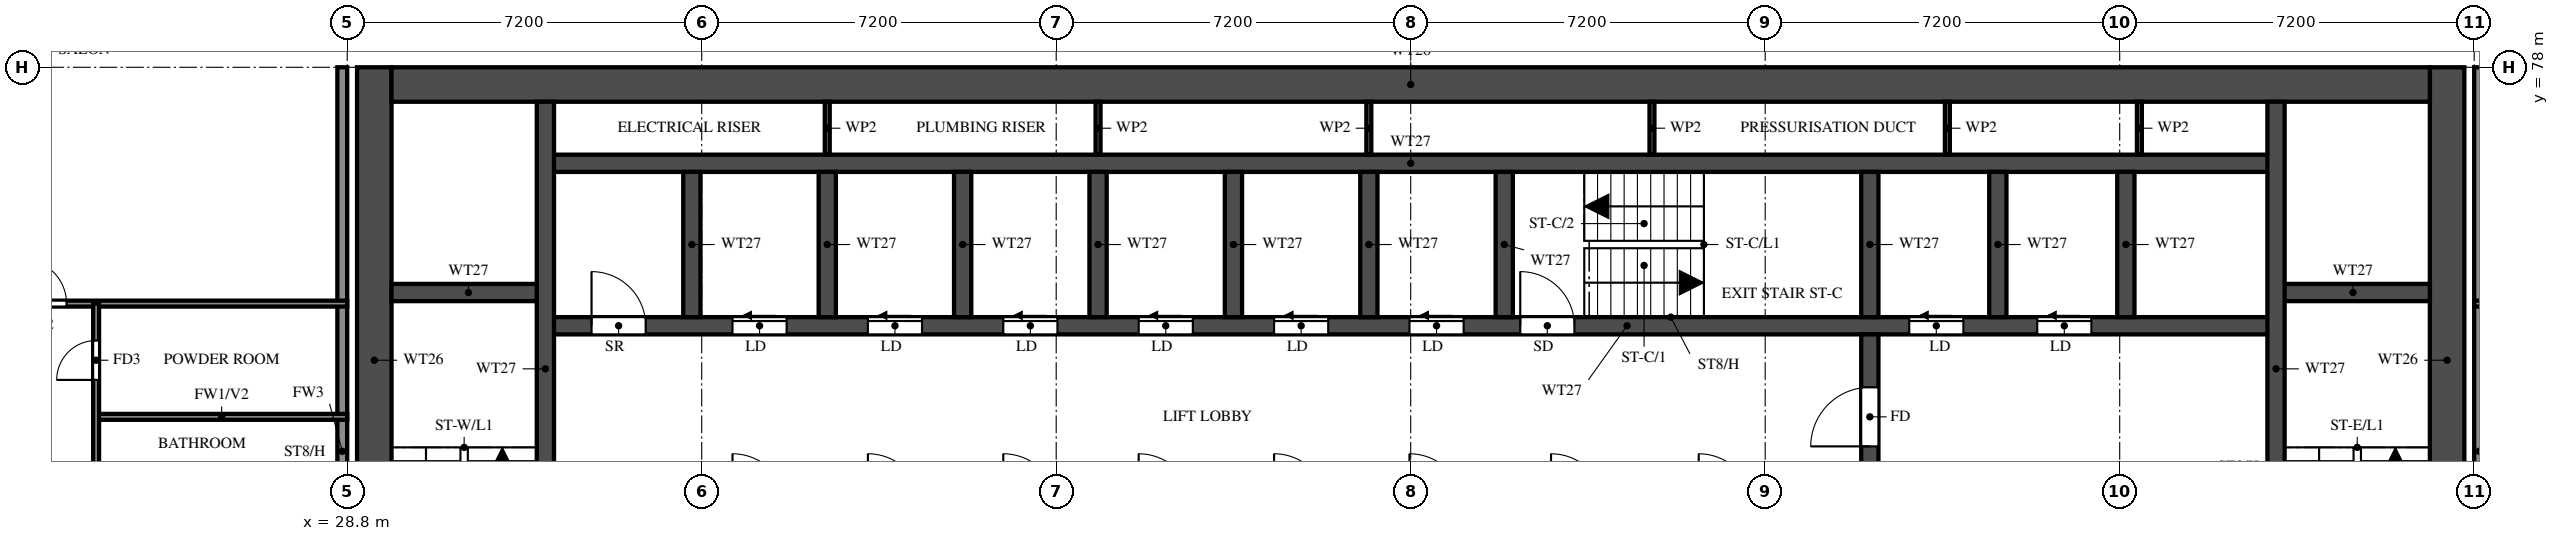
"""IFC4 building model, lengths in metres.
Left out: names, types, materials, properties, quantities, classifications, styles, units other than length and angle.
Written with IfcOpenShell. Run it as: python <this file> out.ifc"""

import sys

from ifc_helpers import new_model, si_unit, direction, frame, frame_2d, origin, place, context, subcontext, project, spatial, rectangle, extrude, element, fill, save


model = new_model("IFC4")
c1 = context("Model", 3, precision=1e-05, world=origin(), true_north=direction((0.0, 1.0)))
c2 = subcontext(c1, "Body", "Model", "MODEL_VIEW")
j1 = project(units=[si_unit("LENGTHUNIT", "METRE"), si_unit("PLANEANGLEUNIT", "RADIAN")], contexts=[c1])
p1 = place(None, origin())
s1 = spatial("IfcSite", under=j1, at=p1, CompositionType="ELEMENT")
p2 = place(p1, origin())
s2 = spatial("IfcBuilding", under=s1, at=p2, CompositionType="ELEMENT")
p3 = place(p2, frame((0.0, 0.0, 178.0)))
s3 = spatial("IfcBuildingStorey", under=s2, at=p3, CompositionType="ELEMENT", Elevation=178.0)
for number, where, z_axis, x_axis in (
    (1, (29.35, 66.1, 0.0), (0.0, 0.0, 1.0), (0.0, 1.0, 0.0)),
    (2, (71.45, 66.1, 0.0), (0.0, 0.0, 1.0), (0.0, 1.0, 0.0)),
):
    element("IfcWall", number, at=place(p3, frame(where, z_axis=z_axis, x_axis=x_axis)), inside=s3, PredefinedType="SHEAR", context=c2, shape_type="SweptSolid", body=[
        extrude(rectangle(XDim=11.9, YDim=0.7, at=frame_2d((5.95, 0.0))), origin(), (0.0, 0.0, 1.0), 3.2),
    ])
p4 = place(p3, frame((29.7, 77.65, 0.0), z_axis=(0.0, 0.0, 1.0), x_axis=(1.0, 0.0, 0.0)))
e3 = element("IfcWall", 3, at=p4, inside=s3, PredefinedType="SHEAR", context=c2, shape_type="SweptSolid", body=[
    extrude(rectangle(XDim=41.4, YDim=0.7, at=frame_2d((20.7, 0.0))), origin(), (0.0, 0.0, 1.0), 3.2),
])
p5 = place(p3, frame((32.825, 72.75, 0.0), z_axis=(0.0, 0.0, 1.0), x_axis=(1.0, 0.0, 0.0)))
e4 = element("IfcWall", 4, at=p5, inside=s3, PredefinedType="SHEAR", context=c2, shape_type="SweptSolid", body=[
    extrude(rectangle(XDim=35.15, YDim=0.35, at=frame_2d((17.575, 0.0))), origin(), (0.0, 0.0, 1.0), 3.2),
])
p6 = place(p5, frame((19.8, 0.0, 0.0)))
e5 = element("IfcOpeningElement", 5, at=p6, cuts=e4, PredefinedType="OPENING", context=c2, shape_type="SweptSolid", body=[
    extrude(rectangle(XDim=1.1, YDim=2.1, at=frame_2d((0.55, 1.05))), frame((0.0, 0.185, 0.0), z_axis=(0.0, -1.0, 0.0), x_axis=(1.0, 0.0, 0.0)), (0.0, 0.0, 1.0), 0.37),
])
p7 = place(p5, frame((27.7, 0.0, 0.0)))
e6 = element("IfcOpeningElement", 6, at=p7, cuts=e4, PredefinedType="OPENING", context=c2, shape_type="SweptSolid", body=[
    extrude(rectangle(XDim=1.1, YDim=2.1, at=frame_2d((0.55, 1.05))), frame((0.0, 0.185, 0.0), z_axis=(0.0, -1.0, 0.0), x_axis=(1.0, 0.0, 0.0)), (0.0, 0.0, 1.0), 0.37),
])
p8 = place(p5, frame((30.3, 0.0, 0.0)))
e7 = element("IfcOpeningElement", 7, at=p8, cuts=e4, PredefinedType="OPENING", context=c2, shape_type="SweptSolid", body=[
    extrude(rectangle(XDim=1.1, YDim=2.1, at=frame_2d((0.55, 1.05))), frame((0.0, 0.185, 0.0), z_axis=(0.0, -1.0, 0.0), x_axis=(1.0, 0.0, 0.0)), (0.0, 0.0, 1.0), 0.37),
])
p9 = place(p5, frame((3.8, 0.0, 0.0)))
e8 = element("IfcOpeningElement", 8, at=p9, cuts=e4, PredefinedType="OPENING", context=c2, shape_type="SweptSolid", body=[
    extrude(rectangle(XDim=1.1, YDim=2.1, at=frame_2d((0.55, 1.05))), frame((0.0, 0.185, 0.0), z_axis=(0.0, -1.0, 0.0), x_axis=(1.0, 0.0, 0.0)), (0.0, 0.0, 1.0), 0.37),
])
p10 = place(p5, frame((6.55, 0.0, 0.0)))
e9 = element("IfcOpeningElement", 9, at=p10, cuts=e4, PredefinedType="OPENING", context=c2, shape_type="SweptSolid", body=[
    extrude(rectangle(XDim=1.1, YDim=2.1, at=frame_2d((0.55, 1.05))), frame((0.0, 0.185, 0.0), z_axis=(0.0, -1.0, 0.0), x_axis=(1.0, 0.0, 0.0)), (0.0, 0.0, 1.0), 0.37),
])
p11 = place(p5, frame((9.3, 0.0, 0.0)))
e10 = element("IfcOpeningElement", 10, at=p11, cuts=e4, PredefinedType="OPENING", context=c2, shape_type="SweptSolid", body=[
    extrude(rectangle(XDim=1.1, YDim=2.1, at=frame_2d((0.55, 1.05))), frame((0.0, 0.185, 0.0), z_axis=(0.0, -1.0, 0.0), x_axis=(1.0, 0.0, 0.0)), (0.0, 0.0, 1.0), 0.37),
])
p12 = place(p5, frame((12.05, 0.0, 0.0)))
e11 = element("IfcOpeningElement", 11, at=p12, cuts=e4, PredefinedType="OPENING", context=c2, shape_type="SweptSolid", body=[
    extrude(rectangle(XDim=1.1, YDim=2.1, at=frame_2d((0.55, 1.05))), frame((0.0, 0.185, 0.0), z_axis=(0.0, -1.0, 0.0), x_axis=(1.0, 0.0, 0.0)), (0.0, 0.0, 1.0), 0.37),
])
p13 = place(p5, frame((14.8, 0.0, 0.0)))
e12 = element("IfcOpeningElement", 12, at=p13, cuts=e4, PredefinedType="OPENING", context=c2, shape_type="SweptSolid", body=[
    extrude(rectangle(XDim=1.1, YDim=2.1, at=frame_2d((0.55, 1.05))), frame((0.0, 0.185, 0.0), z_axis=(0.0, -1.0, 0.0), x_axis=(1.0, 0.0, 0.0)), (0.0, 0.0, 1.0), 0.37),
])
p14 = place(p5, frame((17.55, 0.0, 0.0)))
e13 = element("IfcOpeningElement", 13, at=p14, cuts=e4, PredefinedType="OPENING", context=c2, shape_type="SweptSolid", body=[
    extrude(rectangle(XDim=1.1, YDim=2.1, at=frame_2d((0.55, 1.05))), frame((0.0, 0.185, 0.0), z_axis=(0.0, -1.0, 0.0), x_axis=(1.0, 0.0, 0.0)), (0.0, 0.0, 1.0), 0.37),
])
p15 = place(p5, frame((0.938, 0.0, 0.0)))
e14 = element("IfcOpeningElement", 14, at=p15, cuts=e4, PredefinedType="OPENING", context=c2, shape_type="SweptSolid", body=[
    extrude(rectangle(XDim=1.1, YDim=2.1, at=frame_2d((0.55, 1.05))), frame((0.0, 0.185, 0.0), z_axis=(0.0, -1.0, 0.0), x_axis=(1.0, 0.0, 0.0)), (0.0, 0.0, 1.0), 0.37),
])
p16 = place(p3, frame((32.825, 76.05, 0.0), z_axis=(0.0, 0.0, 1.0), x_axis=(1.0, 0.0, 0.0)))
e15 = element("IfcWall", 15, at=p16, inside=s3, PredefinedType="SHEAR", context=c2, shape_type="SweptSolid", body=[
    extrude(rectangle(XDim=35.15, YDim=0.35, at=frame_2d((17.575, 0.0))), origin(), (0.0, 0.0, 1.0), 3.2),
])
for number, where, z_axis, x_axis in (
    (16, (29.7, 73.425, 0.0), (0.0, 0.0, 1.0), (1.0, 0.0, 0.0)),
    (17, (67.975, 73.425, 0.0), (0.0, 0.0, 1.0), (1.0, 0.0, 0.0)),
):
    element("IfcWall", number, at=place(p3, frame(where, z_axis=z_axis, x_axis=x_axis)), inside=s3, PredefinedType="SHEAR", context=c2, shape_type="SweptSolid", body=[
        extrude(rectangle(XDim=3.125, YDim=0.35, at=frame_2d((1.562, 0.0))), origin(), (0.0, 0.0, 1.0), 3.2),
    ])
p17 = place(p3, frame((32.825, 66.45, 0.0), z_axis=(0.0, 0.0, 1.0), x_axis=(0.0, 1.0, 0.0)))
e18 = element("IfcWall", 18, at=p17, inside=s3, PredefinedType="SHEAR", context=c2, shape_type="SweptSolid", body=[
    extrude(rectangle(XDim=10.85, YDim=0.35, at=frame_2d((5.425, 0.0))), origin(), (0.0, 0.0, 1.0), 3.2),
])
p18 = place(p3, frame((67.975, 66.45, 0.0), z_axis=(0.0, 0.0, 1.0), x_axis=(0.0, 1.0, 0.0)))
e19 = element("IfcWall", 19, at=p18, inside=s3, PredefinedType="SHEAR", context=c2, shape_type="SweptSolid", body=[
    extrude(rectangle(XDim=10.85, YDim=0.35, at=frame_2d((5.425, 0.0))), origin(), (0.0, 0.0, 1.0), 3.2),
])
p19 = place(p18, frame((0.15, 0.0, 0.0)))
e20 = element("IfcOpeningElement", 20, at=p19, cuts=e19, PredefinedType="OPENING", context=c2, shape_type="SweptSolid", body=[
    extrude(rectangle(XDim=1.1, YDim=2.1, at=frame_2d((0.55, 1.05))), frame((0.0, 0.185, 0.0), z_axis=(0.0, -1.0, 0.0), x_axis=(1.0, 0.0, 0.0)), (0.0, 0.0, 1.0), 0.37),
])
p20 = place(p3, frame((59.725, 66.45, 0.0), z_axis=(0.0, 0.0, 1.0), x_axis=(0.0, 1.0, 0.0)))
e21 = element("IfcWall", 21, at=p20, inside=s3, PredefinedType="SHEAR", context=c2, shape_type="SweptSolid", body=[
    extrude(rectangle(XDim=6.125, YDim=0.35, at=frame_2d((3.062, 0.0))), origin(), (0.0, 0.0, 1.0), 3.2),
])
p21 = place(p20, frame((3.85, 0.0, 0.0)))
e22 = element("IfcOpeningElement", 22, at=p21, cuts=e21, PredefinedType="OPENING", context=c2, shape_type="SweptSolid", body=[
    extrude(rectangle(XDim=1.2, YDim=2.1, at=frame_2d((0.6, 1.05))), frame((0.0, 0.185, 0.0), z_axis=(0.0, -1.0, 0.0), x_axis=(1.0, 0.0, 0.0)), (0.0, 0.0, 1.0), 0.37),
])
for number, where, z_axis, x_axis in (
    (23, (59.725, 72.925, 0.0), (0.0, 0.0, 1.0), (0.0, 1.0, 0.0)),
    (24, (35.8, 72.925, 0.0), (0.0, 0.0, 1.0), (0.0, 1.0, 0.0)),
    (25, (38.55, 72.925, 0.0), (0.0, 0.0, 1.0), (0.0, 1.0, 0.0)),
    (26, (41.3, 72.925, 0.0), (0.0, 0.0, 1.0), (0.0, 1.0, 0.0)),
    (27, (44.05, 72.925, 0.0), (0.0, 0.0, 1.0), (0.0, 1.0, 0.0)),
    (28, (46.8, 72.925, 0.0), (0.0, 0.0, 1.0), (0.0, 1.0, 0.0)),
    (29, (49.55, 72.925, 0.0), (0.0, 0.0, 1.0), (0.0, 1.0, 0.0)),
    (30, (52.3, 72.925, 0.0), (0.0, 0.0, 1.0), (0.0, 1.0, 0.0)),
    (31, (62.325, 72.925, 0.0), (0.0, 0.0, 1.0), (0.0, 1.0, 0.0)),
    (32, (64.925, 72.925, 0.0), (0.0, 0.0, 1.0), (0.0, 1.0, 0.0)),
):
    element("IfcWall", number, at=place(p3, frame(where, z_axis=z_axis, x_axis=x_axis)), inside=s3, PredefinedType="SHEAR", context=c2, shape_type="SweptSolid", body=[
        extrude(rectangle(XDim=2.95, YDim=0.35, at=frame_2d((1.475, 0.0))), origin(), (0.0, 0.0, 1.0), 3.2),
    ])
for number, where, z_axis, x_axis in (
    (33, (38.55, 76.225, 0.0), (0.0, 0.0, 1.0), (0.0, 1.0, 0.0)),
    (34, (44.05, 76.225, 0.0), (0.0, 0.0, 1.0), (0.0, 1.0, 0.0)),
    (35, (49.55, 76.225, 0.0), (0.0, 0.0, 1.0), (0.0, 1.0, 0.0)),
    (36, (55.3, 76.225, 0.0), (0.0, 0.0, 1.0), (0.0, 1.0, 0.0)),
    (37, (61.3, 76.225, 0.0), (0.0, 0.0, 1.0), (0.0, 1.0, 0.0)),
    (38, (65.2, 76.225, 0.0), (0.0, 0.0, 1.0), (0.0, 1.0, 0.0)),
):
    element("IfcWall", number, at=place(p3, frame(where, z_axis=z_axis, x_axis=x_axis)), inside=s3, PredefinedType="PARTITIONING", context=c2, shape_type="SweptSolid", body=[
        extrude(rectangle(XDim=1.075, YDim=0.1, at=frame_2d((0.538, 0.0))), origin(), (0.0, 0.0, 1.0), 3.2),
    ])
for number, where, z_axis, x_axis in (
    (39, (28.7, 62.4, 0.0), (0.0, 0.0, 1.0), (0.0, 1.0, 0.0)),
    (40, (72.1, 62.4, 0.0), (0.0, 0.0, 1.0), (0.0, 1.0, 0.0)),
):
    element("IfcWall", number, at=place(p3, frame(where, z_axis=z_axis, x_axis=x_axis)), inside=s3, PredefinedType="SOLIDWALL", context=c2, shape_type="SweptSolid", body=[
        extrude(rectangle(XDim=15.6, YDim=0.2, at=frame_2d((7.8, 0.0))), origin(), (0.0, 0.0, 1.0), 3.2),
    ])
p22 = place(p3, frame((23.7, 70.9, 0.0), z_axis=(0.0, 0.0, 1.0), x_axis=(1.0, 0.0, 0.0)))
e41 = element("IfcWall", 41, at=p22, inside=s3, PredefinedType="PARTITIONING", context=c2, shape_type="SweptSolid", body=[
    extrude(rectangle(XDim=5.1, YDim=0.12, at=frame_2d((2.55, 0.0))), origin(), (0.0, 0.0, 1.0), 3.2),
])
p23 = place(p3, frame((14.525, 73.2, 0.0), z_axis=(0.0, 0.0, 1.0), x_axis=(1.0, 0.0, 0.0)))
e42 = element("IfcWall", 42, at=p23, inside=s3, PredefinedType="PARTITIONING", context=c2, shape_type="SweptSolid", body=[
    extrude(rectangle(XDim=14.275, YDim=0.12, at=frame_2d((7.138, 0.0))), origin(), (0.0, 0.0, 1.0), 2.3),
])
p24 = place(p23, frame((7.675, 0.0, 0.0)))
e43 = element("IfcOpeningElement", 43, at=p24, cuts=e42, PredefinedType="OPENING", context=c2, shape_type="SweptSolid", body=[
    extrude(rectangle(XDim=0.9, YDim=2.1, at=frame_2d((0.45, 1.05))), frame((0.0, 0.07, 0.0), z_axis=(0.0, -1.0, 0.0), x_axis=(1.0, 0.0, 0.0)), (0.0, 0.0, 1.0), 0.14),
])
p25 = place(p3, frame((72.0, 73.2, 0.0), z_axis=(0.0, 0.0, 1.0), x_axis=(1.0, 0.0, 0.0)))
e44 = element("IfcWall", 44, at=p25, inside=s3, PredefinedType="PARTITIONING", context=c2, shape_type="SweptSolid", body=[
    extrude(rectangle(XDim=14.275, YDim=0.12, at=frame_2d((7.137, 0.0))), origin(), (0.0, 0.0, 1.0), 2.3),
])
p26 = place(p25, frame((5.7, 0.0, 0.0)))
e45 = element("IfcOpeningElement", 45, at=p26, cuts=e44, PredefinedType="OPENING", context=c2, shape_type="SweptSolid", body=[
    extrude(rectangle(XDim=0.9, YDim=2.1, at=frame_2d((0.45, 1.05))), frame((0.0, 0.07, 0.0), z_axis=(0.0, -1.0, 0.0), x_axis=(1.0, 0.0, 0.0)), (0.0, 0.0, 1.0), 0.14),
])
p27 = place(p3, frame((23.7, 61.2, 0.0), z_axis=(0.0, 0.0, 1.0), x_axis=(0.0, 1.0, 0.0)))
e46 = element("IfcWall", 46, at=p27, inside=s3, PredefinedType="PARTITIONING", context=c2, shape_type="SweptSolid", body=[
    extrude(rectangle(XDim=12.0, YDim=0.12, at=frame_2d((6.0, 0.0))), origin(), (0.0, 0.0, 1.0), 3.2),
])
p28 = place(p27, frame((4.2, 0.0, 0.0)))
e47 = element("IfcOpeningElement", 47, at=p28, cuts=e46, PredefinedType="OPENING", context=c2, shape_type="SweptSolid", body=[
    extrude(rectangle(XDim=0.9, YDim=2.1, at=frame_2d((0.45, 1.05))), frame((0.0, 0.07, 0.0), z_axis=(0.0, -1.0, 0.0), x_axis=(1.0, 0.0, 0.0)), (0.0, 0.0, 1.0), 0.14),
])
p29 = place(p27, frame((7.975, 0.0, 0.0)))
e48 = element("IfcOpeningElement", 48, at=p29, cuts=e46, PredefinedType="OPENING", context=c2, shape_type="SweptSolid", body=[
    extrude(rectangle(XDim=0.8, YDim=2.1, at=frame_2d((0.4, 1.05))), frame((0.0, 0.07, 0.0), z_axis=(0.0, -1.0, 0.0), x_axis=(1.0, 0.0, 0.0)), (0.0, 0.0, 1.0), 0.14),
])
p30 = place(p27, frame((10.45, 0.0, 0.0)))
e49 = element("IfcOpeningElement", 49, at=p30, cuts=e46, PredefinedType="OPENING", context=c2, shape_type="SweptSolid", body=[
    extrude(rectangle(XDim=0.8, YDim=2.1, at=frame_2d((0.4, 1.05))), frame((0.0, 0.07, 0.0), z_axis=(0.0, -1.0, 0.0), x_axis=(1.0, 0.0, 0.0)), (0.0, 0.0, 1.0), 0.14),
])
p31 = place(p6, origin())
e50 = element("IfcDoor", 50, at=p31, inside=s3, OperationType="SINGLE_SWING_LEFT", PredefinedType="DOOR", context=c2, shape_type="SweptSolid", body=[
    extrude(rectangle(XDim=1.1, YDim=2.1, at=frame_2d((0.55, 1.05))), frame((0.0, 0.025, 0.0), z_axis=(0.0, -1.0, 0.0), x_axis=(1.0, 0.0, 0.0)), (0.0, 0.0, 1.0), 0.05),
])
fill(e5, e50)
p32 = place(p21, origin())
e51 = element("IfcDoor", 51, at=p32, inside=s3, OperationType="SINGLE_SWING_LEFT", PredefinedType="DOOR", context=c2, shape_type="SweptSolid", body=[
    extrude(rectangle(XDim=1.2, YDim=2.1, at=frame_2d((0.6, 1.05))), frame((0.0, 0.025, 0.0), z_axis=(0.0, -1.0, 0.0), x_axis=(1.0, 0.0, 0.0)), (0.0, 0.0, 1.0), 0.05),
])
fill(e22, e51)
p33 = place(p7, origin())
e52 = element("IfcDoor", 52, at=p33, inside=s3, OperationType="SLIDING_TO_LEFT", PredefinedType="DOOR", context=c2, shape_type="SweptSolid", body=[
    extrude(rectangle(XDim=1.1, YDim=2.1, at=frame_2d((0.55, 1.05))), frame((0.0, 0.025, 0.0), z_axis=(0.0, -1.0, 0.0), x_axis=(1.0, 0.0, 0.0)), (0.0, 0.0, 1.0), 0.05),
])
fill(e6, e52)
p34 = place(p8, origin())
e53 = element("IfcDoor", 53, at=p34, inside=s3, OperationType="SLIDING_TO_LEFT", PredefinedType="DOOR", context=c2, shape_type="SweptSolid", body=[
    extrude(rectangle(XDim=1.1, YDim=2.1, at=frame_2d((0.55, 1.05))), frame((0.0, 0.025, 0.0), z_axis=(0.0, -1.0, 0.0), x_axis=(1.0, 0.0, 0.0)), (0.0, 0.0, 1.0), 0.05),
])
fill(e7, e53)
p35 = place(p9, origin())
e54 = element("IfcDoor", 54, at=p35, inside=s3, OperationType="SLIDING_TO_LEFT", PredefinedType="DOOR", context=c2, shape_type="SweptSolid", body=[
    extrude(rectangle(XDim=1.1, YDim=2.1, at=frame_2d((0.55, 1.05))), frame((0.0, 0.025, 0.0), z_axis=(0.0, -1.0, 0.0), x_axis=(1.0, 0.0, 0.0)), (0.0, 0.0, 1.0), 0.05),
])
fill(e8, e54)
p36 = place(p10, origin())
e55 = element("IfcDoor", 55, at=p36, inside=s3, OperationType="SLIDING_TO_LEFT", PredefinedType="DOOR", context=c2, shape_type="SweptSolid", body=[
    extrude(rectangle(XDim=1.1, YDim=2.1, at=frame_2d((0.55, 1.05))), frame((0.0, 0.025, 0.0), z_axis=(0.0, -1.0, 0.0), x_axis=(1.0, 0.0, 0.0)), (0.0, 0.0, 1.0), 0.05),
])
fill(e9, e55)
p37 = place(p11, origin())
e56 = element("IfcDoor", 56, at=p37, inside=s3, OperationType="SLIDING_TO_LEFT", PredefinedType="DOOR", context=c2, shape_type="SweptSolid", body=[
    extrude(rectangle(XDim=1.1, YDim=2.1, at=frame_2d((0.55, 1.05))), frame((0.0, 0.025, 0.0), z_axis=(0.0, -1.0, 0.0), x_axis=(1.0, 0.0, 0.0)), (0.0, 0.0, 1.0), 0.05),
])
fill(e10, e56)
p38 = place(p12, origin())
e57 = element("IfcDoor", 57, at=p38, inside=s3, OperationType="SLIDING_TO_LEFT", PredefinedType="DOOR", context=c2, shape_type="SweptSolid", body=[
    extrude(rectangle(XDim=1.1, YDim=2.1, at=frame_2d((0.55, 1.05))), frame((0.0, 0.025, 0.0), z_axis=(0.0, -1.0, 0.0), x_axis=(1.0, 0.0, 0.0)), (0.0, 0.0, 1.0), 0.05),
])
fill(e11, e57)
p39 = place(p13, origin())
e58 = element("IfcDoor", 58, at=p39, inside=s3, OperationType="SLIDING_TO_LEFT", PredefinedType="DOOR", context=c2, shape_type="SweptSolid", body=[
    extrude(rectangle(XDim=1.1, YDim=2.1, at=frame_2d((0.55, 1.05))), frame((0.0, 0.025, 0.0), z_axis=(0.0, -1.0, 0.0), x_axis=(1.0, 0.0, 0.0)), (0.0, 0.0, 1.0), 0.05),
])
fill(e12, e58)
p40 = place(p14, origin())
e59 = element("IfcDoor", 59, at=p40, inside=s3, OperationType="SLIDING_TO_LEFT", PredefinedType="DOOR", context=c2, shape_type="SweptSolid", body=[
    extrude(rectangle(XDim=1.1, YDim=2.1, at=frame_2d((0.55, 1.05))), frame((0.0, 0.025, 0.0), z_axis=(0.0, -1.0, 0.0), x_axis=(1.0, 0.0, 0.0)), (0.0, 0.0, 1.0), 0.05),
])
fill(e13, e59)
p41 = place(p15, origin())
e60 = element("IfcDoor", 60, at=p41, inside=s3, OperationType="SINGLE_SWING_LEFT", PredefinedType="DOOR", context=c2, shape_type="SweptSolid", body=[
    extrude(rectangle(XDim=1.1, YDim=2.1, at=frame_2d((0.55, 1.05))), frame((0.0, 0.025, 0.0), z_axis=(0.0, -1.0, 0.0), x_axis=(1.0, 0.0, 0.0)), (0.0, 0.0, 1.0), 0.05),
])
fill(e14, e60)
p42 = place(p24, origin())
e61 = element("IfcDoor", 61, at=p42, inside=s3, OperationType="SINGLE_SWING_LEFT", PredefinedType="DOOR", context=c2, shape_type="SweptSolid", body=[
    extrude(rectangle(XDim=0.9, YDim=2.1, at=frame_2d((0.45, 1.05))), frame((0.0, 0.025, 0.0), z_axis=(0.0, -1.0, 0.0), x_axis=(1.0, 0.0, 0.0)), (0.0, 0.0, 1.0), 0.05),
])
fill(e43, e61)
p43 = place(p30, origin())
e62 = element("IfcDoor", 62, at=p43, inside=s3, OperationType="SINGLE_SWING_RIGHT", PredefinedType="DOOR", context=c2, shape_type="SweptSolid", body=[
    extrude(rectangle(XDim=0.8, YDim=2.1, at=frame_2d((0.4, 1.05))), frame((0.0, 0.025, 0.0), z_axis=(0.0, -1.0, 0.0), x_axis=(1.0, 0.0, 0.0)), (0.0, 0.0, 1.0), 0.05),
])
fill(e49, e62)
save(model, sys.argv[1])
